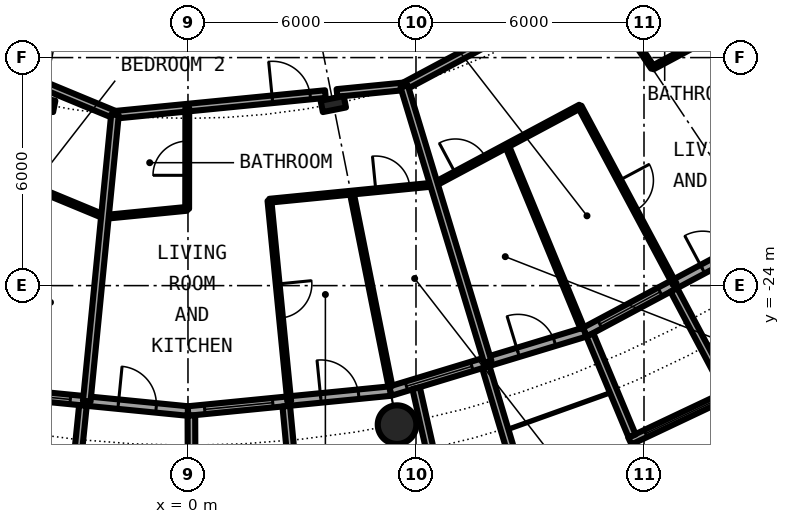
"""IFC4 building model, lengths in metres.
Left out: names, types, materials, properties, quantities, classifications, styles, units other than length and angle.
Written with IfcOpenShell. Run it as: python <this file> out.ifc"""

import sys

from ifc_helpers import new_model, si_unit, direction, frame, frame_2d, origin, origin_2d, place, context, subcontext, project, spatial, rectangle, circle, hollow_circle, i_section, extrude, element, fill, save


model = new_model("IFC4")
c1 = context("Model", 3, precision=1e-05, world=origin(), true_north=direction((0.0, 1.0)))
c2 = subcontext(c1, "Body", "Model", "MODEL_VIEW")
j1 = project(units=[si_unit("LENGTHUNIT", "METRE"), si_unit("PLANEANGLEUNIT", "RADIAN")], contexts=[c1])
p1 = place(None, origin())
s1 = spatial("IfcSite", under=j1, at=p1, CompositionType="ELEMENT")
p2 = place(p1, origin())
s2 = spatial("IfcBuilding", under=s1, at=p2, CompositionType="ELEMENT")
p3 = place(p2, frame((0.0, 0.0, 47.2)))
s3 = spatial("IfcBuildingStorey", under=s2, at=p3, CompositionType="ELEMENT", Elevation=47.2)
p4 = place(p3, frame((5.501, -27.658, 0.0), z_axis=(0.0, 0.0, 1.0), x_axis=(1.0, 0.0, 0.0)))
e1 = element("IfcColumn", 1, at=p4, inside=s3, PredefinedType="COLUMN", context=c2, shape_type="SweptSolid", body=[
    extrude(hollow_circle(Radius=0.508, WallThickness=0.05, at=origin_2d()), origin(), (0.0, 0.0, 1.0), 3.05),
])
for number, where, z_axis, x_axis in (
    (2, (-3.824, -19.223, 0.0), (0.0, 0.0, 1.0), (-0.195, -0.981, 0.0)),
    (3, (3.824, -19.223, 0.0), (0.0, 0.0, 1.0), (0.195, -0.981, 0.0)),
):
    element("IfcColumn", number, at=place(p3, frame(where, z_axis=z_axis, x_axis=x_axis)), inside=s3, PredefinedType="COLUMN", context=c2, shape_type="SweptSolid", body=[
        extrude(i_section(OverallWidth=0.305, OverallDepth=0.62, WebThickness=0.021, FlangeThickness=0.04, FilletRadius=0.027, at=origin_2d()), origin(), (0.0, 0.0, 1.0), 3.05),
    ])
p5 = place(p3, frame((-5.326, -26.775, 0.0), z_axis=(0.0, 0.0, 1.0), x_axis=(0.995173996315, -0.098126026407, 0.0)))
e4 = element("IfcWall", 4, at=p5, inside=s3, PredefinedType="SOLIDWALL", context=c2, shape_type="SweptSolid", body=[
    extrude(rectangle(XDim=5.352, YDim=0.25, at=frame_2d((2.676, 0.0))), origin(), (0.0, 0.0, 1.0), 2.7),
])
p6 = place(p5, frame((0.441, 0.0, 0.3)))
e5 = element("IfcOpeningElement", 5, at=p6, cuts=e4, PredefinedType="OPENING", context=c2, shape_type="SweptSolid", body=[
    extrude(rectangle(XDim=1.8, YDim=2.1, at=frame_2d((0.9, 1.05))), frame((0.0, 0.135, 0.0), z_axis=(0.0, -1.0, 0.0), x_axis=(1.0, 0.0, 0.0)), (0.0, 0.0, 1.0), 0.27),
])
p7 = place(p5, frame((3.51, 0.0, 0.0)))
e6 = element("IfcOpeningElement", 6, at=p7, cuts=e4, PredefinedType="OPENING", context=c2, shape_type="SweptSolid", body=[
    extrude(rectangle(XDim=1.0, YDim=2.2, at=frame_2d((0.5, 1.1))), frame((0.0, 0.135, 0.0), z_axis=(0.0, -1.0, 0.0), x_axis=(1.0, 0.0, 0.0)), (0.0, 0.0, 1.0), 0.27),
])
p8 = place(p3, frame((-2.764, -27.153, -0.03), z_axis=(0.0, 0.0, 1.0), x_axis=(-0.101505487237, -0.994834979311, 0.0)))
e7 = element("IfcWall", 7, at=p8, inside=s3, PredefinedType="SOLIDWALL", context=c2, shape_type="SweptSolid", body=[
    extrude(rectangle(XDim=3.007, YDim=0.2, at=frame_2d((1.503, 0.0))), origin(), (0.0, 0.0, 1.0), 2.73),
])
p9 = place(p3, frame((0.0, -27.3, 0.0), z_axis=(0.0, 0.0, 1.0), x_axis=(0.995173996315, 0.098126026407, 0.0)))
e8 = element("IfcWall", 8, at=p9, inside=s3, PredefinedType="SOLIDWALL", context=c2, shape_type="SweptSolid", body=[
    extrude(rectangle(XDim=5.352, YDim=0.25, at=frame_2d((2.676, 0.0))), origin(), (0.0, 0.0, 1.0), 2.7),
])
p10 = place(p9, frame((0.441, 0.0, 0.3)))
e9 = element("IfcOpeningElement", 9, at=p10, cuts=e8, PredefinedType="OPENING", context=c2, shape_type="SweptSolid", body=[
    extrude(rectangle(XDim=1.8, YDim=2.1, at=frame_2d((0.9, 1.05))), frame((0.0, 0.135, 0.0), z_axis=(0.0, -1.0, 0.0), x_axis=(1.0, 0.0, 0.0)), (0.0, 0.0, 1.0), 0.27),
])
p11 = place(p9, frame((3.51, 0.0, 0.0)))
e10 = element("IfcOpeningElement", 10, at=p11, cuts=e8, PredefinedType="OPENING", context=c2, shape_type="SweptSolid", body=[
    extrude(rectangle(XDim=1.0, YDim=2.2, at=frame_2d((0.5, 1.1))), frame((0.0, 0.135, 0.0), z_axis=(0.0, -1.0, 0.0), x_axis=(1.0, 0.0, 0.0)), (0.0, 0.0, 1.0), 0.27),
])
p12 = place(p3, frame((0.09, -27.417, -0.03), z_axis=(0.0, 0.0, 1.0), x_axis=(0.00347308367, -0.999993968827, 0.0)))
e11 = element("IfcWall", 11, at=p12, inside=s3, PredefinedType="SOLIDWALL", context=c2, shape_type="SweptSolid", body=[
    extrude(rectangle(XDim=2.882, YDim=0.2, at=frame_2d((1.441, 0.0))), origin(), (0.0, 0.0, 1.0), 2.73),
])
p13 = place(p3, frame((2.586, -27.171, -0.03), z_axis=(0.0, 0.0, 1.0), x_axis=(0.094548432284, -0.995520262954, 0.0)))
e12 = element("IfcWall", 12, at=p13, inside=s3, PredefinedType="SOLIDWALL", context=c2, shape_type="SweptSolid", body=[
    extrude(rectangle(XDim=3.006, YDim=0.2, at=frame_2d((1.503, 0.0))), origin(), (0.0, 0.0, 1.0), 2.73),
])
p14 = place(p3, frame((5.326, -26.775, 0.0), z_axis=(0.0, 0.0, 1.0), x_axis=(0.956965678721, 0.290201119486, 0.0)))
e13 = element("IfcWall", 13, at=p14, inside=s3, PredefinedType="SOLIDWALL", context=c2, shape_type="SweptSolid", body=[
    extrude(rectangle(XDim=5.351, YDim=0.25, at=frame_2d((2.676, 0.0))), origin(), (0.0, 0.0, 1.0), 2.7),
])
p15 = place(p14, frame((0.441, 0.0, 0.3)))
e14 = element("IfcOpeningElement", 14, at=p15, cuts=e13, PredefinedType="OPENING", context=c2, shape_type="SweptSolid", body=[
    extrude(rectangle(XDim=1.8, YDim=2.1, at=frame_2d((0.9, 1.05))), frame((0.0, 0.135, 0.0), z_axis=(0.0, -1.0, 0.0), x_axis=(1.0, 0.0, 0.0)), (0.0, 0.0, 1.0), 0.27),
])
p16 = place(p14, frame((3.51, 0.0, 0.0)))
e15 = element("IfcOpeningElement", 15, at=p16, cuts=e13, PredefinedType="OPENING", context=c2, shape_type="SweptSolid", body=[
    extrude(rectangle(XDim=1.0, YDim=2.2, at=frame_2d((0.5, 1.1))), frame((0.0, 0.135, 0.0), z_axis=(0.0, -1.0, 0.0), x_axis=(1.0, 0.0, 0.0)), (0.0, 0.0, 1.0), 0.27),
])
p17 = place(p3, frame((6.004, -26.7, -0.03), z_axis=(0.0, 0.0, 1.0), x_axis=(0.219609259383, -0.975587911566, 0.0)))
e16 = element("IfcWall", 16, at=p17, inside=s3, PredefinedType="SOLIDWALL", context=c2, shape_type="SweptSolid", body=[
    extrude(rectangle(XDim=2.933, YDim=0.2, at=frame_2d((1.466, 0.0))), origin(), (0.0, 0.0, 1.0), 2.73),
])
p18 = place(p3, frame((7.837, -26.144, -0.03), z_axis=(0.0, 0.0, 1.0), x_axis=(0.287064767992, -0.957911174889, 0.0)))
e17 = element("IfcWall", 17, at=p18, inside=s3, PredefinedType="SOLIDWALL", context=c2, shape_type="SweptSolid", body=[
    extrude(rectangle(XDim=3.006, YDim=0.2, at=frame_2d((1.503, 0.0))), origin(), (0.0, 0.0, 1.0), 2.73),
])
p19 = place(p3, frame((10.447, -25.222, 0.0), z_axis=(0.0, 0.0, 1.0), x_axis=(0.881915646801, 0.471407246368, 0.0)))
e18 = element("IfcWall", 18, at=p19, inside=s3, PredefinedType="SOLIDWALL", context=c2, shape_type="SweptSolid", body=[
    extrude(rectangle(XDim=5.352, YDim=0.25, at=frame_2d((2.676, 0.0))), origin(), (0.0, 0.0, 1.0), 2.7),
])
p20 = place(p19, frame((0.441, 0.0, 0.3)))
e19 = element("IfcOpeningElement", 19, at=p20, cuts=e18, PredefinedType="OPENING", context=c2, shape_type="SweptSolid", body=[
    extrude(rectangle(XDim=1.8, YDim=2.1, at=frame_2d((0.9, 1.05))), frame((0.0, 0.135, 0.0), z_axis=(0.0, -1.0, 0.0), x_axis=(1.0, 0.0, 0.0)), (0.0, 0.0, 1.0), 0.27),
])
p21 = place(p19, frame((3.51, 0.0, 0.0)))
e20 = element("IfcOpeningElement", 20, at=p21, cuts=e18, PredefinedType="OPENING", context=c2, shape_type="SweptSolid", body=[
    extrude(rectangle(XDim=1.0, YDim=2.2, at=frame_2d((0.5, 1.1))), frame((0.0, 0.135, 0.0), z_axis=(0.0, -1.0, 0.0), x_axis=(1.0, 0.0, 0.0)), (0.0, 0.0, 1.0), 0.27),
])
p22 = place(p3, frame((11.629, -28.088, -0.03), z_axis=(0.0, 0.0, 1.0), x_axis=(0.904000060331, 0.427532327342, 0.0)))
e21 = element("IfcWall", 21, at=p22, inside=s3, PredefinedType="SOLIDWALL", context=c2, shape_type="SweptSolid", body=[
    extrude(rectangle(XDim=2.993, YDim=0.2, at=frame_2d((1.497, 0.0))), origin(), (0.0, 0.0, 1.0), 2.73),
])
p23 = place(p22, frame((0.457, 0.0, 0.33)))
e22 = element("IfcOpeningElement", 22, at=p23, cuts=e21, PredefinedType="OPENING", context=c2, shape_type="SweptSolid", body=[
    extrude(circle(Radius=1.04, at=frame_2d((1.04, 1.04))), frame((0.0, 0.11, 0.0), z_axis=(0.0, -1.0, 0.0), x_axis=(1.0, 0.0, 0.0)), (0.0, 0.0, 1.0), 0.22),
])
p24 = place(p3, frame((10.575, -25.295, -0.03), z_axis=(0.0, 0.0, 1.0), x_axis=(0.385697364644, -0.922625353492, 0.0)))
e23 = element("IfcWall", 23, at=p24, inside=s3, PredefinedType="SOLIDWALL", context=c2, shape_type="SweptSolid", body=[
    extrude(rectangle(XDim=2.883, YDim=0.2, at=frame_2d((1.442, 0.0))), origin(), (0.0, 0.0, 1.0), 2.73),
])
p25 = place(p3, frame((12.787, -24.113, -0.03), z_axis=(0.0, 0.0, 1.0), x_axis=(0.468365282436, -0.883534924159, 0.0)))
e24 = element("IfcWall", 24, at=p25, inside=s3, PredefinedType="SOLIDWALL", context=c2, shape_type="SweptSolid", body=[
    extrude(rectangle(XDim=3.006, YDim=0.2, at=frame_2d((1.503, 0.0))), origin(), (0.0, 0.0, 1.0), 2.73),
])
p26 = place(p3, frame((-2.196, -22.193, 0.0), z_axis=(0.0, 0.0, 1.0), x_axis=(0.995193648169, 0.097926516552, 0.0)))
e25 = element("IfcWall", 25, at=p26, inside=s3, PredefinedType="PARTITIONING", context=c2, shape_type="SweptSolid", body=[
    extrude(rectangle(XDim=2.177, YDim=0.1, at=frame_2d((1.088, 0.0))), origin(), (0.0, 0.0, 1.0), 2.7),
])
p27 = place(p3, frame((2.144, -21.766, 0.0), z_axis=(0.0, 0.0, 1.0), x_axis=(0.995192120883, 0.097942036599, 0.0)))
e26 = element("IfcWall", 26, at=p27, inside=s3, PredefinedType="PARTITIONING", context=c2, shape_type="SweptSolid", body=[
    extrude(rectangle(XDim=4.35, YDim=0.1, at=frame_2d((2.175, 0.0))), origin(), (0.0, 0.0, 1.0), 2.7),
])
p28 = place(p27, frame((2.812, 0.0, 0.0)))
e27 = element("IfcOpeningElement", 27, at=p28, cuts=e26, PredefinedType="OPENING", context=c2, shape_type="SweptSolid", body=[
    extrude(rectangle(XDim=0.9, YDim=2.3, at=frame_2d((0.45, 1.15))), frame((0.0, 0.06, 0.0), z_axis=(0.0, -1.0, 0.0), x_axis=(1.0, 0.0, 0.0)), (0.0, 0.0, 1.0), 0.12),
])
p29 = place(p3, frame((6.478, -21.34, 0.0), z_axis=(0.0, 0.0, 1.0), x_axis=(0.881765663848, 0.471687729392, 0.0)))
e28 = element("IfcWall", 28, at=p29, inside=s3, PredefinedType="PARTITIONING", context=c2, shape_type="SweptSolid", body=[
    extrude(rectangle(XDim=4.355, YDim=0.1, at=frame_2d((2.177, 0.0))), origin(), (0.0, 0.0, 1.0), 2.7),
])
p30 = place(p29, frame((0.633, 0.0, 0.0)))
e29 = element("IfcOpeningElement", 29, at=p30, cuts=e28, PredefinedType="OPENING", context=c2, shape_type="SweptSolid", body=[
    extrude(rectangle(XDim=0.9, YDim=2.3, at=frame_2d((0.45, 1.15))), frame((0.0, 0.06, 0.0), z_axis=(0.0, -1.0, 0.0), x_axis=(1.0, 0.0, 0.0)), (0.0, 0.0, 1.0), 0.12),
])
p31 = place(p3, frame((12.229, -18.264, 0.0), z_axis=(0.0, 0.0, 1.0), x_axis=(0.881786813167, 0.471648191055, 0.0)))
e30 = element("IfcWall", 30, at=p31, inside=s3, PredefinedType="PARTITIONING", context=c2, shape_type="SweptSolid", body=[
    extrude(rectangle(XDim=2.175, YDim=0.1, at=frame_2d((1.087, 0.0))), origin(), (0.0, 0.0, 1.0), 2.7),
])
p32 = place(p3, frame((-8.164, -19.716, 0.0), z_axis=(0.0, 0.0, 1.0), x_axis=(0.92387253274, -0.38270033087, 0.0)))
e31 = element("IfcWall", 31, at=p32, inside=s3, PredefinedType="PARTITIONING", context=c2, shape_type="SweptSolid", body=[
    extrude(rectangle(XDim=6.475, YDim=0.1, at=frame_2d((3.238, 0.0))), origin(), (0.0, 0.0, 1.0), 2.7),
])
p33 = place(p3, frame((-1.927, -19.506, 0.0), z_axis=(0.0, 0.0, 1.0), x_axis=(0.995181086618, 0.098054091383, 0.0)))
e32 = element("IfcWall", 32, at=p33, inside=s3, PredefinedType="PARTITIONING", context=c2, shape_type="SweptSolid", body=[
    extrude(rectangle(XDim=5.57, YDim=0.2, at=frame_2d((2.785, 0.0))), origin(), (0.0, 0.0, 1.0), 2.38),
])
p34 = place(p33, frame((4.168, 0.0, 0.0)))
e33 = element("IfcOpeningElement", 33, at=p34, cuts=e32, PredefinedType="OPENING", context=c2, shape_type="SweptSolid", body=[
    extrude(rectangle(XDim=1.0, YDim=2.3, at=frame_2d((0.5, 1.15))), frame((0.0, 0.11, 0.0), z_axis=(0.0, -1.0, 0.0), x_axis=(1.0, 0.0, 0.0)), (0.0, 0.0, 1.0), 0.22),
])
p35 = place(p3, frame((3.921, -18.93, 0.0), z_axis=(0.0, 0.0, 1.0), x_axis=(0.995207057161, 0.097790149696, 0.0)))
e34 = element("IfcWall", 34, at=p35, inside=s3, PredefinedType="PARTITIONING", context=c2, shape_type="SweptSolid", body=[
    extrude(rectangle(XDim=1.778, YDim=0.2, at=frame_2d((0.889, 0.0))), origin(), (0.0, 0.0, 1.0), 2.38),
])
p36 = place(p3, frame((5.69, -18.756, 0.0), z_axis=(0.0, 0.0, 1.0), x_axis=(0.881866548297, 0.471499089072, 0.0)))
e35 = element("IfcWall", 35, at=p36, inside=s3, PredefinedType="PARTITIONING", context=c2, shape_type="SweptSolid", body=[
    extrude(rectangle(XDim=5.563, YDim=0.2, at=frame_2d((2.782, 0.0))), origin(), (0.0, 0.0, 1.0), 2.38),
])
p37 = place(p36, frame((2.368, 0.0, 0.0)))
e36 = element("IfcOpeningElement", 36, at=p37, cuts=e35, PredefinedType="OPENING", context=c2, shape_type="SweptSolid", body=[
    extrude(rectangle(XDim=1.0, YDim=2.3, at=frame_2d((0.5, 1.15))), frame((0.0, 0.11, 0.0), z_axis=(0.0, -1.0, 0.0), x_axis=(1.0, 0.0, 0.0)), (0.0, 0.0, 1.0), 0.22),
])
p38 = place(p3, frame((-12.434, -15.151, 0.0), z_axis=(0.0, 0.0, 1.0), x_axis=(0.923888467236, -0.382661861319, 0.0)))
e37 = element("IfcWall", 37, at=p38, inside=s3, PredefinedType="PARTITIONING", context=c2, shape_type="SweptSolid", body=[
    extrude(rectangle(XDim=11.381, YDim=0.2, at=frame_2d((5.691, 0.0))), origin(), (0.0, 0.0, 1.0), 2.7),
])
p39 = place(p38, frame((3.292, 0.0, 0.0)))
e38 = element("IfcOpeningElement", 38, at=p39, cuts=e37, PredefinedType="OPENING", context=c2, shape_type="SweptSolid", body=[
    extrude(rectangle(XDim=1.0, YDim=2.3, at=frame_2d((0.5, 1.15))), frame((0.0, 0.11, 0.0), z_axis=(0.0, -1.0, 0.0), x_axis=(1.0, 0.0, 0.0)), (0.0, 0.0, 1.0), 0.22),
])
p40 = place(p3, frame((-2.664, -27.044, 0.0), z_axis=(0.0, 0.0, 1.0), x_axis=(0.098115395479, 0.995175044487, 0.0)))
e39 = element("IfcWall", 39, at=p40, inside=s3, PredefinedType="PARTITIONING", context=c2, shape_type="SweptSolid", body=[
    extrude(rectangle(XDim=7.574, YDim=0.2, at=frame_2d((3.787, 0.0))), origin(), (0.0, 0.0, 1.0), 2.7),
])
p41 = place(p3, frame((-0.021, -21.979, 0.0), z_axis=(0.0, 0.0, 1.0), x_axis=(0.001101017775, 0.99999939388, 0.0)))
e40 = element("IfcWall", 40, at=p41, inside=s3, PredefinedType="PARTITIONING", context=c2, shape_type="SweptSolid", body=[
    extrude(rectangle(XDim=2.661, YDim=0.1, at=frame_2d((1.331, 0.0))), origin(), (0.0, 0.0, 1.0), 2.7),
])
p42 = place(p41, frame((0.881, 0.0, 0.0)))
e41 = element("IfcOpeningElement", 41, at=p42, cuts=e40, PredefinedType="OPENING", context=c2, shape_type="SweptSolid", body=[
    extrude(rectangle(XDim=0.9, YDim=2.3, at=frame_2d((0.45, 1.15))), frame((0.0, 0.06, 0.0), z_axis=(0.0, -1.0, 0.0), x_axis=(1.0, 0.0, 0.0)), (0.0, 0.0, 1.0), 0.12),
])
p43 = place(p3, frame((2.144, -21.766, 0.0), z_axis=(0.0, 0.0, 1.0), x_axis=(0.098054199821, -0.995181075934, 0.0)))
e42 = element("IfcWall", 42, at=p43, inside=s3, PredefinedType="PARTITIONING", context=c2, shape_type="SweptSolid", body=[
    extrude(rectangle(XDim=5.303, YDim=0.1, at=frame_2d((2.652, 0.0))), origin(), (0.0, 0.0, 1.0), 2.7),
])
p44 = place(p43, frame((2.202, 0.0, 0.0)))
e43 = element("IfcOpeningElement", 43, at=p44, cuts=e42, PredefinedType="OPENING", context=c2, shape_type="SweptSolid", body=[
    extrude(rectangle(XDim=0.9, YDim=2.3, at=frame_2d((0.45, 1.15))), frame((0.0, 0.06, 0.0), z_axis=(0.0, -1.0, 0.0), x_axis=(1.0, 0.0, 0.0)), (0.0, 0.0, 1.0), 0.12),
])
p45 = place(p3, frame((4.309, -21.553, 0.0), z_axis=(0.0, 0.0, 1.0), x_axis=(0.195899255693, -0.980624026638, 0.0)))
e44 = element("IfcWall", 44, at=p45, inside=s3, PredefinedType="PARTITIONING", context=c2, shape_type="SweptSolid", body=[
    extrude(rectangle(XDim=5.196, YDim=0.1, at=frame_2d((2.598, 0.0))), origin(), (0.0, 0.0, 1.0), 2.7),
])
p46 = place(p3, frame((5.689, -18.756, 0.0), z_axis=(0.0, 0.0, 1.0), x_axis=(0.290294523619, -0.956937348815, 0.0)))
e45 = element("IfcWall", 45, at=p46, inside=s3, PredefinedType="PARTITIONING", context=c2, shape_type="SweptSolid", body=[
    extrude(rectangle(XDim=7.575, YDim=0.2, at=frame_2d((3.788, 0.0))), origin(), (0.0, 0.0, 1.0), 2.7),
])
p47 = place(p3, frame((8.392, -20.314, 0.0), z_axis=(0.0, 0.0, 1.0), x_axis=(0.381673756215, -0.924297107978, 0.0)))
e46 = element("IfcWall", 46, at=p47, inside=s3, PredefinedType="PARTITIONING", context=c2, shape_type="SweptSolid", body=[
    extrude(rectangle(XDim=5.195, YDim=0.1, at=frame_2d((2.598, 0.0))), origin(), (0.0, 0.0, 1.0), 2.7),
])
p48 = place(p3, frame((10.31, -19.289, 0.0), z_axis=(0.0, 0.0, 1.0), x_axis=(0.47140999111, -0.881914179658, 0.0)))
e47 = element("IfcWall", 47, at=p48, inside=s3, PredefinedType="PARTITIONING", context=c2, shape_type="SweptSolid", body=[
    extrude(rectangle(XDim=5.303, YDim=0.1, at=frame_2d((2.652, 0.0))), origin(), (0.0, 0.0, 1.0), 2.7),
])
p49 = place(p48, frame((2.202, 0.0, 0.0)))
e48 = element("IfcOpeningElement", 48, at=p49, cuts=e47, PredefinedType="OPENING", context=c2, shape_type="SweptSolid", body=[
    extrude(rectangle(XDim=0.9, YDim=2.3, at=frame_2d((0.45, 1.15))), frame((0.0, 0.06, 0.0), z_axis=(0.0, -1.0, 0.0), x_axis=(1.0, 0.0, 0.0)), (0.0, 0.0, 1.0), 0.12),
])
p50 = place(p3, frame((11.077, -16.544, 0.0), z_axis=(0.0, 0.0, 1.0), x_axis=(0.556522278225, -0.830832687031, 0.0)))
e49 = element("IfcWall", 49, at=p50, inside=s3, PredefinedType="PARTITIONING", context=c2, shape_type="SweptSolid", body=[
    extrude(rectangle(XDim=2.07, YDim=0.1, at=frame_2d((1.035, 0.0))), origin(), (0.0, 0.0, 1.0), 2.7),
])
p51 = place(p50, frame((0.458, 0.0, 0.0)))
e50 = element("IfcOpeningElement", 50, at=p51, cuts=e49, PredefinedType="OPENING", context=c2, shape_type="SweptSolid", body=[
    extrude(rectangle(XDim=0.9, YDim=2.3, at=frame_2d((0.45, 1.15))), frame((0.0, 0.06, 0.0), z_axis=(0.0, -1.0, 0.0), x_axis=(1.0, 0.0, 0.0)), (0.0, 0.0, 1.0), 0.12),
])
p52 = place(p3, frame((12.434, -15.151, 0.0), z_axis=(0.0, 0.0, 1.0), x_axis=(0.634381303318, -0.773020285633, 0.0)))
e51 = element("IfcWall", 51, at=p52, inside=s3, PredefinedType="PARTITIONING", context=c2, shape_type="SweptSolid", body=[
    extrude(rectangle(XDim=7.576, YDim=0.2, at=frame_2d((3.788, 0.0))), origin(), (0.0, 0.0, 1.0), 2.7),
])
p53 = place(p6, origin())
e52 = element("IfcWindow", 52, at=p53, inside=s3, PartitioningType="SINGLE_PANEL", PredefinedType="WINDOW", context=c2, shape_type="SweptSolid", body=[
    extrude(rectangle(XDim=1.8, YDim=2.1, at=frame_2d((0.9, 1.05))), frame((0.0, 0.03, 0.0), z_axis=(0.0, -1.0, 0.0), x_axis=(1.0, 0.0, 0.0)), (0.0, 0.0, 1.0), 0.06),
])
fill(e5, e52)
p54 = place(p7, origin())
e53 = element("IfcDoor", 53, at=p54, inside=s3, OperationType="SINGLE_SWING_LEFT", PredefinedType="DOOR", context=c2, shape_type="SweptSolid", body=[
    extrude(rectangle(XDim=1.0, YDim=2.2, at=frame_2d((0.5, 1.1))), frame((0.0, 0.025, 0.0), z_axis=(0.0, -1.0, 0.0), x_axis=(1.0, 0.0, 0.0)), (0.0, 0.0, 1.0), 0.05),
])
fill(e6, e53)
p55 = place(p10, origin())
e54 = element("IfcWindow", 54, at=p55, inside=s3, PartitioningType="SINGLE_PANEL", PredefinedType="WINDOW", context=c2, shape_type="SweptSolid", body=[
    extrude(rectangle(XDim=1.8, YDim=2.1, at=frame_2d((0.9, 1.05))), frame((0.0, 0.03, 0.0), z_axis=(0.0, -1.0, 0.0), x_axis=(1.0, 0.0, 0.0)), (0.0, 0.0, 1.0), 0.06),
])
fill(e9, e54)
p56 = place(p11, origin())
e55 = element("IfcDoor", 55, at=p56, inside=s3, OperationType="SINGLE_SWING_LEFT", PredefinedType="DOOR", context=c2, shape_type="SweptSolid", body=[
    extrude(rectangle(XDim=1.0, YDim=2.2, at=frame_2d((0.5, 1.1))), frame((0.0, 0.025, 0.0), z_axis=(0.0, -1.0, 0.0), x_axis=(1.0, 0.0, 0.0)), (0.0, 0.0, 1.0), 0.05),
])
fill(e10, e55)
p57 = place(p15, origin())
e56 = element("IfcWindow", 56, at=p57, inside=s3, PartitioningType="SINGLE_PANEL", PredefinedType="WINDOW", context=c2, shape_type="SweptSolid", body=[
    extrude(rectangle(XDim=1.8, YDim=2.1, at=frame_2d((0.9, 1.05))), frame((0.0, 0.03, 0.0), z_axis=(0.0, -1.0, 0.0), x_axis=(1.0, 0.0, 0.0)), (0.0, 0.0, 1.0), 0.06),
])
fill(e14, e56)
p58 = place(p16, origin())
e57 = element("IfcDoor", 57, at=p58, inside=s3, OperationType="SINGLE_SWING_LEFT", PredefinedType="DOOR", context=c2, shape_type="SweptSolid", body=[
    extrude(rectangle(XDim=1.0, YDim=2.2, at=frame_2d((0.5, 1.1))), frame((0.0, 0.025, 0.0), z_axis=(0.0, -1.0, 0.0), x_axis=(1.0, 0.0, 0.0)), (0.0, 0.0, 1.0), 0.05),
])
fill(e15, e57)
p59 = place(p20, origin())
e58 = element("IfcWindow", 58, at=p59, inside=s3, PartitioningType="SINGLE_PANEL", PredefinedType="WINDOW", context=c2, shape_type="SweptSolid", body=[
    extrude(rectangle(XDim=1.8, YDim=2.1, at=frame_2d((0.9, 1.05))), frame((0.0, 0.03, 0.0), z_axis=(0.0, -1.0, 0.0), x_axis=(1.0, 0.0, 0.0)), (0.0, 0.0, 1.0), 0.06),
])
fill(e19, e58)
p60 = place(p23, origin())
e59 = element("IfcWindow", 59, at=p60, inside=s3, PartitioningType="SINGLE_PANEL", PredefinedType="WINDOW", context=c2, shape_type="SweptSolid", body=[
    extrude(circle(Radius=1.04, at=frame_2d((1.04, 1.04))), frame((0.0, 0.03, 0.0), z_axis=(0.0, -1.0, 0.0), x_axis=(1.0, 0.0, 0.0)), (0.0, 0.0, 1.0), 0.06),
])
fill(e22, e59)
p61 = place(p21, origin())
e60 = element("IfcDoor", 60, at=p61, inside=s3, OperationType="SINGLE_SWING_LEFT", PredefinedType="DOOR", context=c2, shape_type="SweptSolid", body=[
    extrude(rectangle(XDim=1.0, YDim=2.2, at=frame_2d((0.5, 1.1))), frame((0.0, 0.025, 0.0), z_axis=(0.0, -1.0, 0.0), x_axis=(1.0, 0.0, 0.0)), (0.0, 0.0, 1.0), 0.05),
])
fill(e20, e60)
p62 = place(p34, origin())
e61 = element("IfcDoor", 61, at=p62, inside=s3, OperationType="SINGLE_SWING_RIGHT", PredefinedType="DOOR", context=c2, shape_type="SweptSolid", body=[
    extrude(rectangle(XDim=1.0, YDim=2.3, at=frame_2d((0.5, 1.15))), frame((0.0, 0.025, 0.0), z_axis=(0.0, -1.0, 0.0), x_axis=(1.0, 0.0, 0.0)), (0.0, 0.0, 1.0), 0.05),
])
fill(e33, e61)
p63 = place(p42, origin())
e62 = element("IfcDoor", 62, at=p63, inside=s3, OperationType="SINGLE_SWING_RIGHT", PredefinedType="DOOR", context=c2, shape_type="SweptSolid", body=[
    extrude(rectangle(XDim=0.9, YDim=2.3, at=frame_2d((0.45, 1.15))), frame((0.0, 0.025, 0.0), z_axis=(0.0, -1.0, 0.0), x_axis=(1.0, 0.0, 0.0)), (0.0, 0.0, 1.0), 0.05),
])
fill(e41, e62)
p64 = place(p44, origin())
e63 = element("IfcDoor", 63, at=p64, inside=s3, OperationType="SINGLE_SWING_LEFT", PredefinedType="DOOR", context=c2, shape_type="SweptSolid", body=[
    extrude(rectangle(XDim=0.9, YDim=2.3, at=frame_2d((0.45, 1.15))), frame((0.0, 0.025, 0.0), z_axis=(0.0, -1.0, 0.0), x_axis=(1.0, 0.0, 0.0)), (0.0, 0.0, 1.0), 0.05),
])
fill(e43, e63)
p65 = place(p28, origin())
e64 = element("IfcDoor", 64, at=p65, inside=s3, OperationType="SINGLE_SWING_RIGHT", PredefinedType="DOOR", context=c2, shape_type="SweptSolid", body=[
    extrude(rectangle(XDim=0.9, YDim=2.3, at=frame_2d((0.45, 1.15))), frame((0.0, 0.025, 0.0), z_axis=(0.0, -1.0, 0.0), x_axis=(1.0, 0.0, 0.0)), (0.0, 0.0, 1.0), 0.05),
])
fill(e27, e64)
p66 = place(p49, origin())
e65 = element("IfcDoor", 65, at=p66, inside=s3, OperationType="SINGLE_SWING_RIGHT", PredefinedType="DOOR", context=c2, shape_type="SweptSolid", body=[
    extrude(rectangle(XDim=0.9, YDim=2.3, at=frame_2d((0.45, 1.15))), frame((0.0, 0.025, 0.0), z_axis=(0.0, -1.0, 0.0), x_axis=(1.0, 0.0, 0.0)), (0.0, 0.0, 1.0), 0.05),
])
fill(e48, e65)
p67 = place(p30, origin())
e66 = element("IfcDoor", 66, at=p67, inside=s3, OperationType="SINGLE_SWING_LEFT", PredefinedType="DOOR", context=c2, shape_type="SweptSolid", body=[
    extrude(rectangle(XDim=0.9, YDim=2.3, at=frame_2d((0.45, 1.15))), frame((0.0, 0.025, 0.0), z_axis=(0.0, -1.0, 0.0), x_axis=(1.0, 0.0, 0.0)), (0.0, 0.0, 1.0), 0.05),
])
fill(e29, e66)
save(model, sys.argv[1])
